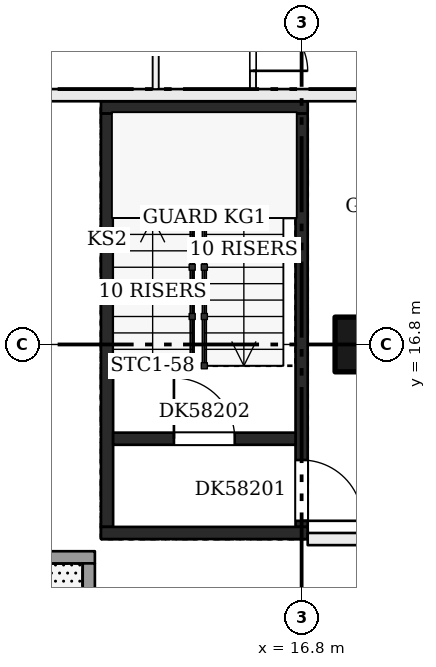
"""IFC4 building model, lengths in metres.
Left out: names, types, materials, properties, quantities, classifications, styles, units other than length and angle.
Written with IfcOpenShell. Run it as: python <this file> out.ifc"""

import sys

from ifc_helpers import new_model, si_unit, direction, frame, frame_2d, origin, origin_2d, place, context, subcontext, project, spatial, rectangle, extrude, element, fill, save


model = new_model("IFC4")
c1 = context("Model", 3, precision=1e-05, world=origin(), true_north=direction((0.0, 1.0)))
c2 = subcontext(c1, "Body", "Model", "MODEL_VIEW")
j1 = project(units=[si_unit("LENGTHUNIT", "METRE"), si_unit("PLANEANGLEUNIT", "RADIAN")], contexts=[c1])
p1 = place(None, origin())
s1 = spatial("IfcSite", under=j1, at=p1, CompositionType="ELEMENT")
p2 = place(p1, origin())
s2 = spatial("IfcBuilding", under=s1, at=p2, CompositionType="ELEMENT")
p3 = place(p2, frame((0.0, 0.0, 224.7)))
s3 = spatial("IfcBuildingStorey", under=s2, at=p3, CompositionType="ELEMENT", Elevation=224.7)
p4 = place(p3, frame((17.8, 16.8, 0.0), z_axis=(0.0, 0.0, 1.0), x_axis=(1.0, 0.0, 0.0)))
e1 = element("IfcColumn", 1, at=p4, inside=s3, PredefinedType="COLUMN", context=c2, shape_type="SweptSolid", body=[
    extrude(rectangle(XDim=0.9, YDim=0.9, at=origin_2d()), origin(), (0.0, 0.0, 1.0), 3.22),
])
p5 = place(p3, frame((13.6, 13.8, 0.0), z_axis=(0.0, 0.0, 1.0), x_axis=(0.0, 1.0, 0.0)))
e2 = element("IfcWall", 2, at=p5, inside=s3, PredefinedType="SHEAR", context=c2, shape_type="SweptSolid", body=[
    extrude(rectangle(XDim=6.8, YDim=0.2, at=frame_2d((3.4, 0.0))), origin(), (0.0, 0.0, 1.0), 3.22),
])
p6 = place(p3, frame((16.8, 13.8, 0.0), z_axis=(0.0, 0.0, 1.0), x_axis=(0.0, 1.0, 0.0)))
e3 = element("IfcWall", 3, at=p6, inside=s3, PredefinedType="SHEAR", context=c2, shape_type="SweptSolid", body=[
    extrude(rectangle(XDim=6.8, YDim=0.2, at=frame_2d((3.4, 0.0))), origin(), (0.0, 0.0, 1.0), 3.22),
])
p7 = place(p6, frame((0.1, 0.0, 0.0)))
e4 = element("IfcOpeningElement", 4, at=p7, cuts=e3, PredefinedType="OPENING", context=c2, shape_type="SweptSolid", body=[
    extrude(rectangle(XDim=1.0, YDim=2.1, at=frame_2d((0.5, 1.05))), frame((0.0, 0.11, 0.0), z_axis=(0.0, -1.0, 0.0), x_axis=(1.0, 0.0, 0.0)), (0.0, 0.0, 1.0), 0.22),
])
for number, where, z_axis, x_axis in (
    (5, (13.5, 13.7, 0.0), (0.0, 0.0, 1.0), (1.0, 0.0, 0.0)),
    (6, (13.5, 20.7, 0.0), (0.0, 0.0, 1.0), (1.0, 0.0, 0.0)),
):
    element("IfcWall", number, at=place(p3, frame(where, z_axis=z_axis, x_axis=x_axis)), inside=s3, PredefinedType="SHEAR", context=c2, shape_type="SweptSolid", body=[
        extrude(rectangle(XDim=3.4, YDim=0.2, at=frame_2d((1.7, 0.0))), origin(), (0.0, 0.0, 1.0), 3.22),
    ])
p8 = place(p3, frame((13.7, 15.25, 0.0), z_axis=(0.0, 0.0, 1.0), x_axis=(1.0, 0.0, 0.0)))
e7 = element("IfcWall", 7, at=p8, inside=s3, PredefinedType="SHEAR", context=c2, shape_type="SweptSolid", body=[
    extrude(rectangle(XDim=3.0, YDim=0.2, at=frame_2d((1.5, 0.0))), origin(), (0.0, 0.0, 1.0), 3.22),
])
p9 = place(p8, frame((1.0, 0.0, 0.0)))
e8 = element("IfcOpeningElement", 8, at=p9, cuts=e7, PredefinedType="OPENING", context=c2, shape_type="SweptSolid", body=[
    extrude(rectangle(XDim=1.0, YDim=2.1, at=frame_2d((0.5, 1.05))), frame((0.0, 0.11, 0.0), z_axis=(0.0, -1.0, 0.0), x_axis=(1.0, 0.0, 0.0)), (0.0, 0.0, 1.0), 0.22),
])
p10 = place(p3, frame((16.9, 13.6, 0.0), z_axis=(0.0, 0.0, 1.0), x_axis=(1.0, 0.0, 0.0)))
e9 = element("IfcWall", 9, at=p10, inside=s3, PredefinedType="PARTITIONING", context=c2, shape_type="SweptSolid", body=[
    extrude(rectangle(XDim=4.2, YDim=0.2, at=frame_2d((2.1, 0.0))), origin(), (0.0, 0.0, 1.0), 3.22),
])
p11 = place(p10, frame((1.6, 0.0, 0.0)))
e10 = element("IfcOpeningElement", 10, at=p11, cuts=e9, PredefinedType="OPENING", context=c2, shape_type="SweptSolid", body=[
    extrude(rectangle(XDim=1.0, YDim=2.1, at=frame_2d((0.5, 1.05))), frame((0.0, 0.11, 0.0), z_axis=(0.0, -1.0, 0.0), x_axis=(1.0, 0.0, 0.0)), (0.0, 0.0, 1.0), 0.22),
])
p12 = place(p3, frame((10.9, 20.9, 0.0), z_axis=(0.0, 0.0, 1.0), x_axis=(1.0, 0.0, 0.0)))
e11 = element("IfcWall", 11, at=p12, inside=s3, PredefinedType="PARTITIONING", context=c2, shape_type="SweptSolid", body=[
    extrude(rectangle(XDim=8.3, YDim=0.2, at=frame_2d((4.15, 0.0))), origin(), (0.0, 0.0, 1.0), 3.22),
])
p13 = place(p3, frame((14.4, 21.0, 0.0), z_axis=(0.0, 0.0, 1.0), x_axis=(0.0, 1.0, 0.0)))
e12 = element("IfcWall", 12, at=p13, inside=s3, PredefinedType="PARTITIONING", context=c2, shape_type="SweptSolid", body=[
    extrude(rectangle(XDim=19.0, YDim=0.1, at=frame_2d((9.5, 0.0))), origin(), (0.0, 0.0, 1.0), 3.22),
])
p14 = place(p13, frame((1.6, 0.0, 0.0)))
e13 = element("IfcOpeningElement", 13, at=p14, cuts=e12, PredefinedType="OPENING", context=c2, shape_type="SweptSolid", body=[
    extrude(rectangle(XDim=0.9, YDim=2.1, at=frame_2d((0.45, 1.05))), frame((0.0, 0.06, 0.0), z_axis=(0.0, -1.0, 0.0), x_axis=(1.0, 0.0, 0.0)), (0.0, 0.0, 1.0), 0.12),
])
p15 = place(p13, frame((5.8, 0.0, 0.0)))
e14 = element("IfcOpeningElement", 14, at=p15, cuts=e12, PredefinedType="OPENING", context=c2, shape_type="SweptSolid", body=[
    extrude(rectangle(XDim=0.9, YDim=2.1, at=frame_2d((0.45, 1.05))), frame((0.0, 0.06, 0.0), z_axis=(0.0, -1.0, 0.0), x_axis=(1.0, 0.0, 0.0)), (0.0, 0.0, 1.0), 0.12),
])
p16 = place(p13, frame((13.3, 0.0, 0.0)))
e15 = element("IfcOpeningElement", 15, at=p16, cuts=e12, PredefinedType="OPENING", context=c2, shape_type="SweptSolid", body=[
    extrude(rectangle(XDim=0.9, YDim=2.1, at=frame_2d((0.45, 1.05))), frame((0.0, 0.06, 0.0), z_axis=(0.0, -1.0, 0.0), x_axis=(1.0, 0.0, 0.0)), (0.0, 0.0, 1.0), 0.12),
])
p17 = place(p3, frame((16.0, 21.0, 0.0), z_axis=(0.0, 0.0, 1.0), x_axis=(0.0, 1.0, 0.0)))
e16 = element("IfcWall", 16, at=p17, inside=s3, PredefinedType="PARTITIONING", context=c2, shape_type="SweptSolid", body=[
    extrude(rectangle(XDim=19.0, YDim=0.1, at=frame_2d((9.5, 0.0))), origin(), (0.0, 0.0, 1.0), 3.22),
])
p18 = place(p17, frame((2.6, 0.0, 0.0)))
e17 = element("IfcOpeningElement", 17, at=p18, cuts=e16, PredefinedType="OPENING", context=c2, shape_type="SweptSolid", body=[
    extrude(rectangle(XDim=0.9, YDim=2.1, at=frame_2d((0.45, 1.05))), frame((0.0, 0.06, 0.0), z_axis=(0.0, -1.0, 0.0), x_axis=(1.0, 0.0, 0.0)), (0.0, 0.0, 1.0), 0.12),
])
p19 = place(p17, frame((0.3, 0.0, 0.0)))
e18 = element("IfcOpeningElement", 18, at=p19, cuts=e16, PredefinedType="OPENING", context=c2, shape_type="SweptSolid", body=[
    extrude(rectangle(XDim=0.9, YDim=2.1, at=frame_2d((0.45, 1.05))), frame((0.0, 0.06, 0.0), z_axis=(0.0, -1.0, 0.0), x_axis=(1.0, 0.0, 0.0)), (0.0, 0.0, 1.0), 0.12),
])
p20 = place(p17, frame((7.7, 0.0, 0.0)))
e19 = element("IfcOpeningElement", 19, at=p20, cuts=e16, PredefinedType="OPENING", context=c2, shape_type="SweptSolid", body=[
    extrude(rectangle(XDim=0.9, YDim=2.1, at=frame_2d((0.45, 1.05))), frame((0.0, 0.06, 0.0), z_axis=(0.0, -1.0, 0.0), x_axis=(1.0, 0.0, 0.0)), (0.0, 0.0, 1.0), 0.12),
])
p21 = place(p17, frame((13.3, 0.0, 0.0)))
e20 = element("IfcOpeningElement", 20, at=p21, cuts=e16, PredefinedType="OPENING", context=c2, shape_type="SweptSolid", body=[
    extrude(rectangle(XDim=0.9, YDim=2.1, at=frame_2d((0.45, 1.05))), frame((0.0, 0.06, 0.0), z_axis=(0.0, -1.0, 0.0), x_axis=(1.0, 0.0, 0.0)), (0.0, 0.0, 1.0), 0.12),
])
p22 = place(p17, frame((16.7, 0.0, 0.0)))
e21 = element("IfcOpeningElement", 21, at=p22, cuts=e16, PredefinedType="OPENING", context=c2, shape_type="SweptSolid", body=[
    extrude(rectangle(XDim=0.9, YDim=2.1, at=frame_2d((0.45, 1.05))), frame((0.0, 0.06, 0.0), z_axis=(0.0, -1.0, 0.0), x_axis=(1.0, 0.0, 0.0)), (0.0, 0.0, 1.0), 0.12),
])
p23 = place(p3, frame((10.8, 13.3, 0.0), z_axis=(0.0, 0.0, 1.0), x_axis=(1.0, 0.0, 0.0)))
e22 = element("IfcWall", 22, at=p23, inside=s3, PredefinedType="SOLIDWALL", context=c2, shape_type="SweptSolid", body=[
    extrude(rectangle(XDim=2.6, YDim=0.2, at=frame_2d((1.3, 0.0))), origin(), (0.0, 0.0, 1.0), 3.22),
])
p24 = place(p3, frame((13.3, 13.2, 0.0), z_axis=(0.0, 0.0, 1.0), x_axis=(0.0, -1.0, 0.0)))
e23 = element("IfcWall", 23, at=p24, inside=s3, PredefinedType="SOLIDWALL", context=c2, shape_type="SweptSolid", body=[
    extrude(rectangle(XDim=2.2, YDim=0.2, at=frame_2d((1.1, 0.0))), origin(), (0.0, 0.0, 1.0), 3.22),
])
p25 = place(p7, frame((1.0, 0.0, 0.0), z_axis=(0.0, 0.0, 1.0), x_axis=(-1.0, 0.0, 0.0)))
e24 = element("IfcDoor", 24, at=p25, inside=s3, OperationType="SINGLE_SWING_RIGHT", PredefinedType="DOOR", context=c2, shape_type="SweptSolid", body=[
    extrude(rectangle(XDim=1.0, YDim=2.1, at=frame_2d((0.5, 1.05))), frame((0.0, 0.025, 0.0), z_axis=(0.0, -1.0, 0.0), x_axis=(1.0, 0.0, 0.0)), (0.0, 0.0, 1.0), 0.05),
])
fill(e4, e24)
p26 = place(p9, origin())
e25 = element("IfcDoor", 25, at=p26, inside=s3, OperationType="SINGLE_SWING_LEFT", PredefinedType="DOOR", context=c2, shape_type="SweptSolid", body=[
    extrude(rectangle(XDim=1.0, YDim=2.1, at=frame_2d((0.5, 1.05))), frame((0.0, 0.025, 0.0), z_axis=(0.0, -1.0, 0.0), x_axis=(1.0, 0.0, 0.0)), (0.0, 0.0, 1.0), 0.05),
])
fill(e8, e25)
p27 = place(p19, frame((0.9, 0.0, 0.0), z_axis=(0.0, 0.0, 1.0), x_axis=(-1.0, 0.0, 0.0)))
e26 = element("IfcDoor", 26, at=p27, inside=s3, OperationType="SINGLE_SWING_RIGHT", PredefinedType="DOOR", context=c2, shape_type="SweptSolid", body=[
    extrude(rectangle(XDim=0.9, YDim=2.1, at=frame_2d((0.45, 1.05))), frame((0.0, 0.025, 0.0), z_axis=(0.0, -1.0, 0.0), x_axis=(1.0, 0.0, 0.0)), (0.0, 0.0, 1.0), 0.05),
])
fill(e18, e26)
save(model, sys.argv[1])
